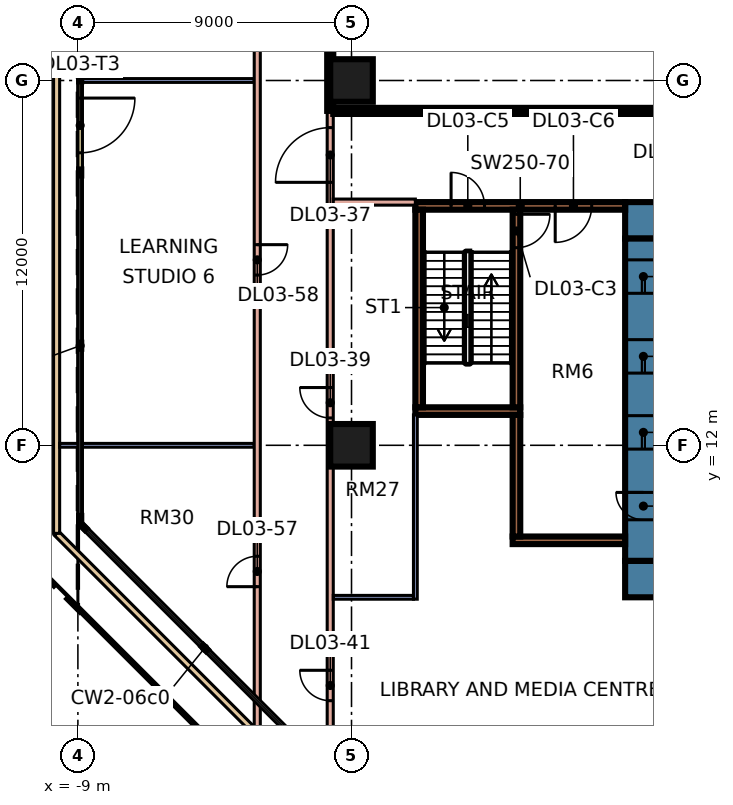
"""IFC4 building model, lengths in metres.
Left out: names, types, materials, properties, quantities, classifications, styles, units other than length and angle.
Written with IfcOpenShell. Run it as: python <this file> out.ifc"""

import sys

from ifc_helpers import new_model, si_unit, direction, frame, frame_2d, origin, origin_2d, place, context, subcontext, project, spatial, rectangle, extrude, element, fill, save


model = new_model("IFC4")
c1 = context("Model", 3, precision=1e-05, world=origin(), true_north=direction((0.0, 1.0)))
c2 = subcontext(c1, "Body", "Model", "MODEL_VIEW")
j1 = project(units=[si_unit("LENGTHUNIT", "METRE"), si_unit("PLANEANGLEUNIT", "RADIAN")], contexts=[c1])
p1 = place(None, origin())
s1 = spatial("IfcSite", under=j1, at=p1, CompositionType="ELEMENT")
p2 = place(p1, origin())
s2 = spatial("IfcBuilding", under=s1, at=p2, CompositionType="ELEMENT")
p3 = place(p2, frame((0.0, 0.0, 16.8)))
s3 = spatial("IfcBuildingStorey", under=s2, at=p3, CompositionType="ELEMENT", Elevation=16.8)
for number, where, z_axis, x_axis in (
    (1, (0.0, 12.0, 0.0), (0.0, 0.0, 1.0), (1.0, 0.0, 0.0)),
    (2, (0.0, 24.0, 0.0), (0.0, 0.0, 1.0), (1.0, 0.0, 0.0)),
):
    element("IfcColumn", number, at=place(p3, frame(where, z_axis=z_axis, x_axis=x_axis)), inside=s3, PredefinedType="COLUMN", context=c2, shape_type="SweptSolid", body=[
        extrude(rectangle(XDim=1.4, YDim=1.4, at=origin_2d()), origin(), (0.0, 0.0, 1.0), 4.8),
    ])
p4 = place(p3, frame((9.0, 7.6, 0.0), z_axis=(0.0, 0.0, 1.0), x_axis=(1.0, 0.0, 0.0)))
e3 = element("IfcWall", 3, at=p4, inside=s3, PredefinedType="SHEAR", context=c2, shape_type="SweptSolid", body=[
    extrude(rectangle(XDim=25.0, YDim=1.2, at=frame_2d((12.5, 0.0))), origin(), (0.0, 0.0, 1.0), 4.8),
])
p5 = place(p3, frame((9.0, 19.4, 0.0), z_axis=(0.0, 0.0, 1.0), x_axis=(1.0, 0.0, 0.0)))
e4 = element("IfcWall", 4, at=p5, inside=s3, PredefinedType="SHEAR", context=c2, shape_type="SweptSolid", body=[
    extrude(rectangle(XDim=25.0, YDim=1.2, at=frame_2d((12.5, 0.0))), origin(), (0.0, 0.0, 1.0), 4.8),
])
p6 = place(p5, frame((19.1, 0.0, 0.0)))
e5 = element("IfcOpeningElement", 5, at=p6, cuts=e4, PredefinedType="OPENING", context=c2, shape_type="SweptSolid", body=[
    extrude(rectangle(XDim=1.8, YDim=2.4, at=frame_2d((0.9, 1.2))), frame((0.0, 0.61, 0.0), z_axis=(0.0, -1.0, 0.0), x_axis=(1.0, 0.0, 0.0)), (0.0, 0.0, 1.0), 1.22),
])
p7 = place(p3, frame((9.6, 8.2, 0.0), z_axis=(0.0, 0.0, 1.0), x_axis=(0.0, 1.0, 0.0)))
e6 = element("IfcWall", 6, at=p7, inside=s3, PredefinedType="SHEAR", context=c2, shape_type="SweptSolid", body=[
    extrude(rectangle(XDim=10.6, YDim=1.2, at=frame_2d((5.3, 0.0))), origin(), (0.0, 0.0, 1.0), 4.8),
])
p8 = place(p7, frame((3.675, 0.0, 0.0)))
e7 = element("IfcOpeningElement", 7, at=p8, cuts=e6, PredefinedType="OPENING", context=c2, shape_type="SweptSolid", body=[
    extrude(rectangle(XDim=1.1, YDim=2.2, at=frame_2d((0.55, 1.1))), frame((0.0, 0.61, 0.0), z_axis=(0.0, -1.0, 0.0), x_axis=(1.0, 0.0, 0.0)), (0.0, 0.0, 1.0), 1.22),
])
p9 = place(p7, frame((6.175, 0.0, 0.0)))
e8 = element("IfcOpeningElement", 8, at=p9, cuts=e6, PredefinedType="OPENING", context=c2, shape_type="SweptSolid", body=[
    extrude(rectangle(XDim=1.1, YDim=2.2, at=frame_2d((0.55, 1.1))), frame((0.0, 0.61, 0.0), z_axis=(0.0, -1.0, 0.0), x_axis=(1.0, 0.0, 0.0)), (0.0, 0.0, 1.0), 1.22),
])
p10 = place(p7, frame((8.8, 0.0, 0.0)))
e9 = element("IfcOpeningElement", 9, at=p10, cuts=e6, PredefinedType="OPENING", context=c2, shape_type="SweptSolid", body=[
    extrude(rectangle(XDim=1.1, YDim=2.2, at=frame_2d((0.55, 1.1))), frame((0.0, 0.61, 0.0), z_axis=(0.0, -1.0, 0.0), x_axis=(1.0, 0.0, 0.0)), (0.0, 0.0, 1.0), 1.22),
])
p11 = place(p7, frame((1.35, 0.0, 0.0)))
e10 = element("IfcOpeningElement", 10, at=p11, cuts=e6, PredefinedType="OPENING", context=c2, shape_type="SweptSolid", body=[
    extrude(rectangle(XDim=0.9, YDim=2.1, at=frame_2d((0.45, 1.05))), frame((0.0, 0.61, 0.0), z_axis=(0.0, -1.0, 0.0), x_axis=(1.0, 0.0, 0.0)), (0.0, 0.0, 1.0), 1.22),
])
p12 = place(p3, frame((2.1, 19.875, 0.0), z_axis=(0.0, 0.0, 1.0), x_axis=(1.0, 0.0, 0.0)))
e11 = element("IfcWall", 11, at=p12, inside=s3, PredefinedType="SHEAR", context=c2, shape_type="SweptSolid", body=[
    extrude(rectangle(XDim=6.9, YDim=0.25, at=frame_2d((3.45, 0.0))), origin(), (0.0, 0.0, 1.0), 4.8),
])
p13 = place(p12, frame((1.175, 0.0, 0.0)))
e12 = element("IfcOpeningElement", 12, at=p13, cuts=e11, PredefinedType="OPENING", context=c2, shape_type="SweptSolid", body=[
    extrude(rectangle(XDim=1.1, YDim=2.2, at=frame_2d((0.55, 1.1))), frame((0.0, 0.135, 0.0), z_axis=(0.0, -1.0, 0.0), x_axis=(1.0, 0.0, 0.0)), (0.0, 0.0, 1.0), 0.27),
])
p14 = place(p12, frame((4.6, 0.0, 0.0)))
e13 = element("IfcOpeningElement", 13, at=p14, cuts=e11, PredefinedType="OPENING", context=c2, shape_type="SweptSolid", body=[
    extrude(rectangle(XDim=1.2, YDim=2.2, at=frame_2d((0.6, 1.1))), frame((0.0, 0.135, 0.0), z_axis=(0.0, -1.0, 0.0), x_axis=(1.0, 0.0, 0.0)), (0.0, 0.0, 1.0), 0.27),
])
p15 = place(p3, frame((2.1, 13.125, 0.0), z_axis=(0.0, 0.0, 1.0), x_axis=(1.0, 0.0, 0.0)))
e14 = element("IfcWall", 14, at=p15, inside=s3, PredefinedType="SHEAR", context=c2, shape_type="SweptSolid", body=[
    extrude(rectangle(XDim=3.45, YDim=0.25, at=frame_2d((1.725, 0.0))), origin(), (0.0, 0.0, 1.0), 4.8),
])
p16 = place(p3, frame((2.225, 13.25, 0.0), z_axis=(0.0, 0.0, 1.0), x_axis=(0.0, 1.0, 0.0)))
e15 = element("IfcWall", 15, at=p16, inside=s3, PredefinedType="SHEAR", context=c2, shape_type="SweptSolid", body=[
    extrude(rectangle(XDim=6.5, YDim=0.25, at=frame_2d((3.25, 0.0))), origin(), (0.0, 0.0, 1.0), 4.8),
])
p17 = place(p3, frame((5.425, 13.25, 0.0), z_axis=(0.0, 0.0, 1.0), x_axis=(0.0, 1.0, 0.0)))
e16 = element("IfcWall", 16, at=p17, inside=s3, PredefinedType="SHEAR", context=c2, shape_type="SweptSolid", body=[
    extrude(rectangle(XDim=6.5, YDim=0.25, at=frame_2d((3.25, 0.0))), origin(), (0.0, 0.0, 1.0), 4.8),
])
p18 = place(p17, frame((5.25, 0.0, 0.0)))
e17 = element("IfcOpeningElement", 17, at=p18, cuts=e16, PredefinedType="OPENING", context=c2, shape_type="SweptSolid", body=[
    extrude(rectangle(XDim=1.1, YDim=2.2, at=frame_2d((0.55, 1.1))), frame((0.0, 0.135, 0.0), z_axis=(0.0, -1.0, 0.0), x_axis=(1.0, 0.0, 0.0)), (0.0, 0.0, 1.0), 0.27),
])
p19 = place(p3, frame((5.3, 8.875, 0.0), z_axis=(0.0, 0.0, 1.0), x_axis=(1.0, 0.0, 0.0)))
e18 = element("IfcWall", 18, at=p19, inside=s3, PredefinedType="SHEAR", context=c2, shape_type="SweptSolid", body=[
    extrude(rectangle(XDim=3.7, YDim=0.25, at=frame_2d((1.85, 0.0))), origin(), (0.0, 0.0, 1.0), 4.8),
])
p20 = place(p3, frame((5.425, 9.0, 0.0), z_axis=(0.0, 0.0, 1.0), x_axis=(0.0, 1.0, 0.0)))
e19 = element("IfcWall", 19, at=p20, inside=s3, PredefinedType="SHEAR", context=c2, shape_type="SweptSolid", body=[
    extrude(rectangle(XDim=4.0, YDim=0.25, at=frame_2d((2.0, 0.0))), origin(), (0.0, 0.0, 1.0), 4.8),
])
p21 = place(p3, frame((-8.925, 24.022, 0.0), z_axis=(0.0, 0.0, 1.0), x_axis=(0.0, -1.0, 0.0)))
e20 = element("IfcWall", 20, at=p21, inside=s3, PredefinedType="SOLIDWALL", context=c2, shape_type="SweptSolid", body=[
    extrude(rectangle(XDim=3.0, YDim=0.15, at=frame_2d((1.5, 0.0))), origin(), (0.0, 0.0, 1.0), 4.4),
])
p22 = place(p21, frame((0.6, 0.0, 0.0)))
e21 = element("IfcOpeningElement", 21, at=p22, cuts=e20, PredefinedType="OPENING", context=c2, shape_type="SweptSolid", body=[
    extrude(rectangle(XDim=1.8, YDim=2.4, at=frame_2d((0.9, 1.2))), frame((0.0, 0.085, 0.0), z_axis=(0.0, -1.0, 0.0), x_axis=(1.0, 0.0, 0.0)), (0.0, 0.0, 1.0), 0.17),
])
p23 = place(p3, frame((9.104, -9.7, 0.0), z_axis=(0.0, 0.0, 1.0), x_axis=(-0.707106781187, 0.707106781187, 0.0)))
e22 = element("IfcWall", 22, at=p23, inside=s3, PredefinedType="PARAPET", context=c2, shape_type="SweptSolid", body=[
    extrude(rectangle(XDim=26.592, YDim=0.2, at=frame_2d((13.296, 0.0))), origin(), (0.0, 0.0, 1.0), 0.5),
])
p24 = place(p3, frame((-9.7, 9.104, 0.0), z_axis=(0.0, 0.0, 1.0), x_axis=(0.0, 1.0, 0.0)))
e23 = element("IfcWall", 23, at=p24, inside=s3, PredefinedType="PARAPET", context=c2, shape_type="SweptSolid", body=[
    extrude(rectangle(XDim=55.793, YDim=0.2, at=frame_2d((27.896, 0.0))), origin(), (0.0, 0.0, 1.0), 0.5),
])
p25 = place(p3, frame((-9.6, 12.0, 0.0), z_axis=(0.0, 0.0, 1.0), x_axis=(1.0, 0.0, 0.0)))
e24 = element("IfcWall", 24, at=p25, inside=s3, PredefinedType="PARTITIONING", context=c2, shape_type="SweptSolid", body=[
    extrude(rectangle(XDim=6.4, YDim=0.125, at=frame_2d((3.2, 0.0))), origin(), (0.0, 0.0, 1.0), 4.4),
])
p26 = place(p3, frame((-8.851, 24.0, 0.0), z_axis=(0.0, 0.0, 1.0), x_axis=(1.0, 0.0, 0.0)))
e25 = element("IfcWall", 25, at=p26, inside=s3, PredefinedType="PARTITIONING", context=c2, shape_type="SweptSolid", body=[
    extrude(rectangle(XDim=5.651, YDim=0.125, at=frame_2d((2.826, 0.0))), origin(), (0.0, 0.0, 1.0), 4.4),
])
p27 = place(p3, frame((-3.1, 2.645, 0.0), z_axis=(0.0, 0.0, 1.0), x_axis=(0.0, 1.0, 0.0)))
e26 = element("IfcWall", 26, at=p27, inside=s3, PredefinedType="PARTITIONING", context=c2, shape_type="SweptSolid", body=[
    extrude(rectangle(XDim=63.455, YDim=0.2, at=frame_2d((31.728, 0.0))), origin(), (0.0, 0.0, 1.0), 4.4),
])
p28 = place(p27, frame((4.705, 0.0, 0.0)))
e27 = element("IfcOpeningElement", 27, at=p28, cuts=e26, PredefinedType="OPENING", context=c2, shape_type="SweptSolid", body=[
    extrude(rectangle(XDim=1.0, YDim=2.1, at=frame_2d((0.5, 1.05))), frame((0.0, 0.11, 0.0), z_axis=(0.0, -1.0, 0.0), x_axis=(1.0, 0.0, 0.0)), (0.0, 0.0, 1.0), 0.22),
])
p29 = place(p27, frame((14.955, 0.0, 0.0)))
e28 = element("IfcOpeningElement", 28, at=p29, cuts=e26, PredefinedType="OPENING", context=c2, shape_type="SweptSolid", body=[
    extrude(rectangle(XDim=1.0, YDim=2.1, at=frame_2d((0.5, 1.05))), frame((0.0, 0.11, 0.0), z_axis=(0.0, -1.0, 0.0), x_axis=(1.0, 0.0, 0.0)), (0.0, 0.0, 1.0), 0.22),
])
p30 = place(p27, frame((26.955, 0.0, 0.0)))
e29 = element("IfcOpeningElement", 29, at=p30, cuts=e26, PredefinedType="OPENING", context=c2, shape_type="SweptSolid", body=[
    extrude(rectangle(XDim=1.0, YDim=2.1, at=frame_2d((0.5, 1.05))), frame((0.0, 0.11, 0.0), z_axis=(0.0, -1.0, 0.0), x_axis=(1.0, 0.0, 0.0)), (0.0, 0.0, 1.0), 0.22),
])
p31 = place(p27, frame((37.455, 0.0, 0.0)))
e30 = element("IfcOpeningElement", 30, at=p31, cuts=e26, PredefinedType="OPENING", context=c2, shape_type="SweptSolid", body=[
    extrude(rectangle(XDim=1.0, YDim=2.1, at=frame_2d((0.5, 1.05))), frame((0.0, 0.11, 0.0), z_axis=(0.0, -1.0, 0.0), x_axis=(1.0, 0.0, 0.0)), (0.0, 0.0, 1.0), 0.22),
])
p32 = place(p27, frame((46.455, 0.0, 0.0)))
e31 = element("IfcOpeningElement", 31, at=p32, cuts=e26, PredefinedType="OPENING", context=c2, shape_type="SweptSolid", body=[
    extrude(rectangle(XDim=1.0, YDim=2.1, at=frame_2d((0.5, 1.05))), frame((0.0, 0.11, 0.0), z_axis=(0.0, -1.0, 0.0), x_axis=(1.0, 0.0, 0.0)), (0.0, 0.0, 1.0), 0.22),
])
p33 = place(p27, frame((55.455, 0.0, 0.0)))
e32 = element("IfcOpeningElement", 32, at=p33, cuts=e26, PredefinedType="OPENING", context=c2, shape_type="SweptSolid", body=[
    extrude(rectangle(XDim=1.0, YDim=2.1, at=frame_2d((0.5, 1.05))), frame((0.0, 0.11, 0.0), z_axis=(0.0, -1.0, 0.0), x_axis=(1.0, 0.0, 0.0)), (0.0, 0.0, 1.0), 0.22),
])
p34 = place(p27, frame((61.305, 0.0, 0.0)))
e33 = element("IfcOpeningElement", 33, at=p34, cuts=e26, PredefinedType="OPENING", context=c2, shape_type="SweptSolid", body=[
    extrude(rectangle(XDim=1.0, YDim=2.1, at=frame_2d((0.5, 1.05))), frame((0.0, 0.11, 0.0), z_axis=(0.0, -1.0, 0.0), x_axis=(1.0, 0.0, 0.0)), (0.0, 0.0, 1.0), 0.22),
])
p35 = place(p3, frame((-0.7, 1.304, 0.0), z_axis=(0.0, 0.0, 1.0), x_axis=(0.0, 1.0, 0.0)))
e34 = element("IfcWall", 34, at=p35, inside=s3, PredefinedType="PARTITIONING", context=c2, shape_type="SweptSolid", body=[
    extrude(rectangle(XDim=21.696, YDim=0.2, at=frame_2d((10.848, 0.0))), origin(), (0.0, 0.0, 1.0), 4.4),
])
p36 = place(p35, frame((19.346, 0.0, 0.0)))
e35 = element("IfcOpeningElement", 35, at=p36, cuts=e34, PredefinedType="OPENING", context=c2, shape_type="SweptSolid", body=[
    extrude(rectangle(XDim=1.8, YDim=2.1, at=frame_2d((0.9, 1.05))), frame((0.0, 0.11, 0.0), z_axis=(0.0, -1.0, 0.0), x_axis=(1.0, 0.0, 0.0)), (0.0, 0.0, 1.0), 0.22),
])
p37 = place(p35, frame((11.596, 0.0, 0.0)))
e36 = element("IfcOpeningElement", 36, at=p37, cuts=e34, PredefinedType="OPENING", context=c2, shape_type="SweptSolid", body=[
    extrude(rectangle(XDim=1.0, YDim=2.1, at=frame_2d((0.5, 1.05))), frame((0.0, 0.11, 0.0), z_axis=(0.0, -1.0, 0.0), x_axis=(1.0, 0.0, 0.0)), (0.0, 0.0, 1.0), 0.22),
])
p38 = place(p35, frame((2.295, 0.0, 0.0)))
e37 = element("IfcOpeningElement", 37, at=p38, cuts=e34, PredefinedType="OPENING", context=c2, shape_type="SweptSolid", body=[
    extrude(rectangle(XDim=1.0, YDim=2.1, at=frame_2d((0.5, 1.05))), frame((0.0, 0.11, 0.0), z_axis=(0.0, -1.0, 0.0), x_axis=(1.0, 0.0, 0.0)), (0.0, 0.0, 1.0), 0.22),
])
p39 = place(p3, frame((-0.7, 23.0, 0.0), z_axis=(0.0, 0.0, 1.0), x_axis=(0.0, 1.0, 0.0)))
e38 = element("IfcWall", 38, at=p39, inside=s3, PredefinedType="SOLIDWALL", context=c2, shape_type="SweptSolid", body=[
    extrude(rectangle(XDim=6.6, YDim=0.2, at=frame_2d((3.3, 0.0))), origin(), (0.0, 0.0, 1.0), 4.4),
])
p40 = place(p3, frame((-0.6, 7.0, 0.0), z_axis=(0.0, 0.0, 1.0), x_axis=(1.0, 0.0, 0.0)))
e39 = element("IfcWall", 39, at=p40, inside=s3, PredefinedType="PARTITIONING", context=c2, shape_type="SweptSolid", body=[
    extrude(rectangle(XDim=2.638, YDim=0.125, at=frame_2d((1.319, 0.0))), origin(), (0.0, 0.0, 1.0), 4.4),
])
p41 = place(p3, frame((-0.6, 20.0, 0.0), z_axis=(0.0, 0.0, 1.0), x_axis=(1.0, 0.0, 0.0)))
e40 = element("IfcWall", 40, at=p41, inside=s3, PredefinedType="PARTITIONING", context=c2, shape_type="SweptSolid", body=[
    extrude(rectangle(XDim=2.7, YDim=0.2, at=frame_2d((1.35, 0.0))), origin(), (0.0, 0.0, 1.0), 4.4),
])
p42 = place(p3, frame((-0.6, 23.0, 0.0), z_axis=(0.0, 0.0, 1.0), x_axis=(1.0, 0.0, 0.0)))
e41 = element("IfcWall", 41, at=p42, inside=s3, PredefinedType="SOLIDWALL", context=c2, shape_type="SweptSolid", body=[
    extrude(rectangle(XDim=13.3, YDim=0.2, at=frame_2d((6.65, 0.0))), origin(), (0.0, 0.0, 1.0), 4.4),
])
p43 = place(p42, frame((10.6, 0.0, 0.0)))
e42 = element("IfcOpeningElement", 42, at=p43, cuts=e41, PredefinedType="OPENING", context=c2, shape_type="SweptSolid", body=[
    extrude(rectangle(XDim=1.2, YDim=2.1, at=frame_2d((0.6, 1.05))), frame((0.0, 0.11, 0.0), z_axis=(0.0, -1.0, 0.0), x_axis=(1.0, 0.0, 0.0)), (0.0, 0.0, 1.0), 0.22),
])
p44 = place(p3, frame((2.1, 6.938, 0.0), z_axis=(0.0, 0.0, 1.0), x_axis=(0.0, 1.0, 0.0)))
e43 = element("IfcWall", 43, at=p44, inside=s3, PredefinedType="PARTITIONING", context=c2, shape_type="SweptSolid", body=[
    extrude(rectangle(XDim=6.062, YDim=0.125, at=frame_2d((3.031, 0.0))), origin(), (0.0, 0.0, 1.0), 4.4),
])
p45 = place(p22, origin())
e44 = element("IfcDoor", 44, at=p45, inside=s3, OperationType="DOUBLE_DOOR_SINGLE_SWING", PredefinedType="DOOR", context=c2, shape_type="SweptSolid", body=[
    extrude(rectangle(XDim=1.8, YDim=2.4, at=frame_2d((0.9, 1.2))), frame((0.0, 0.025, 0.0), z_axis=(0.0, -1.0, 0.0), x_axis=(1.0, 0.0, 0.0)), (0.0, 0.0, 1.0), 0.05),
])
fill(e21, e44)
p46 = place(p8, origin())
e45 = element("IfcDoor", 45, at=p46, inside=s3, OperationType="DOUBLE_DOOR_SLIDING", PredefinedType="DOOR", context=c2, shape_type="SweptSolid", body=[
    extrude(rectangle(XDim=1.1, YDim=2.2, at=frame_2d((0.55, 1.1))), frame((0.0, 0.025, 0.0), z_axis=(0.0, -1.0, 0.0), x_axis=(1.0, 0.0, 0.0)), (0.0, 0.0, 1.0), 0.05),
])
fill(e7, e45)
p47 = place(p9, origin())
e46 = element("IfcDoor", 46, at=p47, inside=s3, OperationType="DOUBLE_DOOR_SLIDING", PredefinedType="DOOR", context=c2, shape_type="SweptSolid", body=[
    extrude(rectangle(XDim=1.1, YDim=2.2, at=frame_2d((0.55, 1.1))), frame((0.0, 0.025, 0.0), z_axis=(0.0, -1.0, 0.0), x_axis=(1.0, 0.0, 0.0)), (0.0, 0.0, 1.0), 0.05),
])
fill(e8, e46)
p48 = place(p10, origin())
e47 = element("IfcDoor", 47, at=p48, inside=s3, OperationType="DOUBLE_DOOR_SLIDING", PredefinedType="DOOR", context=c2, shape_type="SweptSolid", body=[
    extrude(rectangle(XDim=1.1, YDim=2.2, at=frame_2d((0.55, 1.1))), frame((0.0, 0.025, 0.0), z_axis=(0.0, -1.0, 0.0), x_axis=(1.0, 0.0, 0.0)), (0.0, 0.0, 1.0), 0.05),
])
fill(e9, e47)
p49 = place(p18, origin())
e48 = element("IfcDoor", 48, at=p49, inside=s3, OperationType="SINGLE_SWING_RIGHT", PredefinedType="DOOR", context=c2, shape_type="SweptSolid", body=[
    extrude(rectangle(XDim=1.1, YDim=2.2, at=frame_2d((0.55, 1.1))), frame((0.0, 0.025, 0.0), z_axis=(0.0, -1.0, 0.0), x_axis=(1.0, 0.0, 0.0)), (0.0, 0.0, 1.0), 0.05),
])
fill(e17, e48)
p50 = place(p11, frame((0.9, 0.0, 0.0), z_axis=(0.0, 0.0, 1.0), x_axis=(-1.0, 0.0, 0.0)))
e49 = element("IfcDoor", 49, at=p50, inside=s3, OperationType="SINGLE_SWING_RIGHT", PredefinedType="DOOR", context=c2, shape_type="SweptSolid", body=[
    extrude(rectangle(XDim=0.9, YDim=2.1, at=frame_2d((0.45, 1.05))), frame((0.0, 0.025, 0.0), z_axis=(0.0, -1.0, 0.0), x_axis=(1.0, 0.0, 0.0)), (0.0, 0.0, 1.0), 0.05),
])
fill(e10, e49)
p51 = place(p13, origin())
e50 = element("IfcDoor", 50, at=p51, inside=s3, OperationType="SINGLE_SWING_LEFT", PredefinedType="DOOR", context=c2, shape_type="SweptSolid", body=[
    extrude(rectangle(XDim=1.1, YDim=2.2, at=frame_2d((0.55, 1.1))), frame((0.0, 0.025, 0.0), z_axis=(0.0, -1.0, 0.0), x_axis=(1.0, 0.0, 0.0)), (0.0, 0.0, 1.0), 0.05),
])
fill(e12, e50)
p52 = place(p14, frame((1.2, 0.0, 0.0), z_axis=(0.0, 0.0, 1.0), x_axis=(-1.0, 0.0, 0.0)))
e51 = element("IfcDoor", 51, at=p52, inside=s3, OperationType="SINGLE_SWING_LEFT", PredefinedType="DOOR", context=c2, shape_type="SweptSolid", body=[
    extrude(rectangle(XDim=1.2, YDim=2.2, at=frame_2d((0.6, 1.1))), frame((0.0, 0.025, 0.0), z_axis=(0.0, -1.0, 0.0), x_axis=(1.0, 0.0, 0.0)), (0.0, 0.0, 1.0), 0.05),
])
fill(e13, e51)
p53 = place(p36, origin())
e52 = element("IfcDoor", 52, at=p53, inside=s3, OperationType="DOUBLE_DOOR_SINGLE_SWING", PredefinedType="DOOR", context=c2, shape_type="SweptSolid", body=[
    extrude(rectangle(XDim=1.8, YDim=2.1, at=frame_2d((0.9, 1.05))), frame((0.0, 0.025, 0.0), z_axis=(0.0, -1.0, 0.0), x_axis=(1.0, 0.0, 0.0)), (0.0, 0.0, 1.0), 0.05),
])
fill(e35, e52)
p54 = place(p37, frame((1.0, 0.0, 0.0), z_axis=(0.0, 0.0, 1.0), x_axis=(-1.0, 0.0, 0.0)))
e53 = element("IfcDoor", 53, at=p54, inside=s3, OperationType="SINGLE_SWING_RIGHT", PredefinedType="DOOR", context=c2, shape_type="SweptSolid", body=[
    extrude(rectangle(XDim=1.0, YDim=2.1, at=frame_2d((0.5, 1.05))), frame((0.0, 0.025, 0.0), z_axis=(0.0, -1.0, 0.0), x_axis=(1.0, 0.0, 0.0)), (0.0, 0.0, 1.0), 0.05),
])
fill(e36, e53)
p55 = place(p38, frame((1.0, 0.0, 0.0), z_axis=(0.0, 0.0, 1.0), x_axis=(-1.0, 0.0, 0.0)))
e54 = element("IfcDoor", 54, at=p55, inside=s3, OperationType="SINGLE_SWING_RIGHT", PredefinedType="DOOR", context=c2, shape_type="SweptSolid", body=[
    extrude(rectangle(XDim=1.0, YDim=2.1, at=frame_2d((0.5, 1.05))), frame((0.0, 0.025, 0.0), z_axis=(0.0, -1.0, 0.0), x_axis=(1.0, 0.0, 0.0)), (0.0, 0.0, 1.0), 0.05),
])
fill(e37, e54)
p56 = place(p28, origin())
e55 = element("IfcDoor", 55, at=p56, inside=s3, OperationType="SINGLE_SWING_LEFT", PredefinedType="DOOR", context=c2, shape_type="SweptSolid", body=[
    extrude(rectangle(XDim=1.0, YDim=2.1, at=frame_2d((0.5, 1.05))), frame((0.0, 0.025, 0.0), z_axis=(0.0, -1.0, 0.0), x_axis=(1.0, 0.0, 0.0)), (0.0, 0.0, 1.0), 0.05),
])
fill(e27, e55)
p57 = place(p29, origin())
e56 = element("IfcDoor", 56, at=p57, inside=s3, OperationType="SINGLE_SWING_RIGHT", PredefinedType="DOOR", context=c2, shape_type="SweptSolid", body=[
    extrude(rectangle(XDim=1.0, YDim=2.1, at=frame_2d((0.5, 1.05))), frame((0.0, 0.025, 0.0), z_axis=(0.0, -1.0, 0.0), x_axis=(1.0, 0.0, 0.0)), (0.0, 0.0, 1.0), 0.05),
])
fill(e28, e56)
save(model, sys.argv[1])
